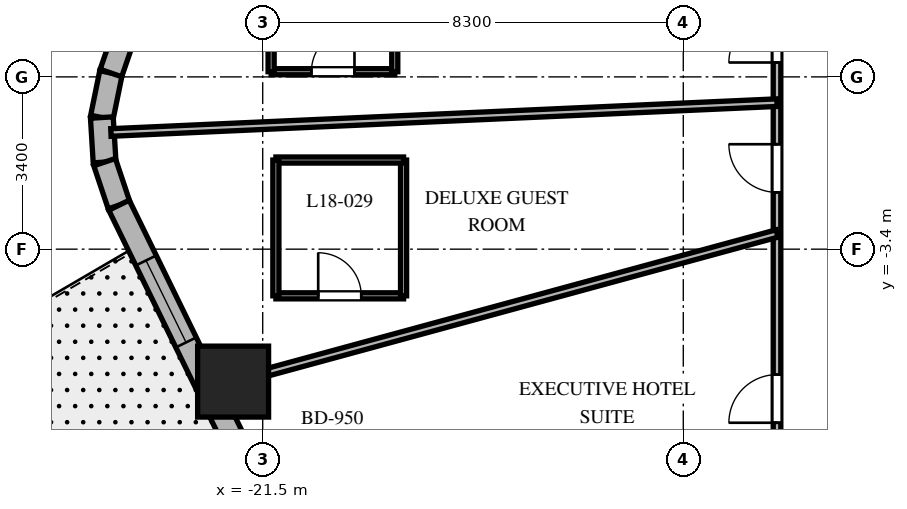
"""IFC4 building model, lengths in metres.
Left out: names, types, materials, properties, quantities, classifications, styles, units other than length and angle.
Written with IfcOpenShell. Run it as: python <this file> out.ifc"""

import sys

from ifc_helpers import new_model, si_unit, direction, frame, frame_2d, origin, origin_2d, place, context, subcontext, project, spatial, rectangle, extrude, element, fill, save


model = new_model("IFC4")
c1 = context("Model", 3, precision=1e-05, world=origin(), true_north=direction((0.0, 1.0)))
c2 = subcontext(c1, "Body", "Model", "MODEL_VIEW")
j1 = project(units=[si_unit("LENGTHUNIT", "METRE"), si_unit("PLANEANGLEUNIT", "RADIAN")], contexts=[c1])
p1 = place(None, origin())
s1 = spatial("IfcSite", under=j1, at=p1, CompositionType="ELEMENT")
p2 = place(p1, origin())
s2 = spatial("IfcBuilding", under=s1, at=p2, CompositionType="ELEMENT")
p3 = place(p2, frame((0.0, 0.0, 78.6)))
s3 = spatial("IfcBuildingStorey", under=s2, at=p3, CompositionType="ELEMENT", Elevation=78.6)
p4 = place(p3, frame((-22.084, -6.014, 0.0), z_axis=(0.0, 0.0, 1.0), x_axis=(1.0, 0.0, 0.0)))
e1 = element("IfcColumn", 1, at=p4, inside=s3, PredefinedType="COLUMN", context=c2, shape_type="SweptSolid", body=[
    extrude(rectangle(XDim=1.4, YDim=1.4, at=origin_2d()), origin(), (0.0, 0.0, 1.0), 3.7),
])
p5 = place(p3, frame((-24.496, 0.077, 0.0), z_axis=(0.0, 0.0, 1.0), x_axis=(-0.199570594521, -0.979883451132, 0.0)))
e2 = element("IfcWall", 2, at=p5, inside=s3, PredefinedType="SOLIDWALL", context=c2, shape_type="SweptSolid", body=[
    extrude(rectangle(XDim=0.897, YDim=0.45, at=frame_2d((0.448, 0.0))), origin(), (0.0, 0.0, 1.0), 3.4),
])
p6 = place(p3, frame((-24.675, -0.802, 0.0), z_axis=(0.0, 0.0, 1.0), x_axis=(0.061188874166, -0.998126205286, 0.0)))
e3 = element("IfcWall", 3, at=p6, inside=s3, PredefinedType="SOLIDWALL", context=c2, shape_type="SweptSolid", body=[
    extrude(rectangle(XDim=0.882, YDim=0.45, at=frame_2d((0.441, 0.0))), origin(), (0.0, 0.0, 1.0), 3.4),
])
p7 = place(p3, frame((-24.621, -1.682, 0.0), z_axis=(0.0, 0.0, 1.0), x_axis=(0.317697451681, -0.948192137278, 0.0)))
e4 = element("IfcWall", 4, at=p7, inside=s3, PredefinedType="SOLIDWALL", context=c2, shape_type="SweptSolid", body=[
    extrude(rectangle(XDim=0.897, YDim=0.45, at=frame_2d((0.448, 0.0))), origin(), (0.0, 0.0, 1.0), 3.4),
])
p8 = place(p3, frame((-17.39, 20.678, 0.0), z_axis=(0.0, 0.0, 1.0), x_axis=(-0.326068018294, -0.945346310854, 0.0)))
e5 = element("IfcWall", 5, at=p8, inside=s3, PredefinedType="SOLIDWALL", context=c2, shape_type="SweptSolid", body=[
    extrude(rectangle(XDim=21.793, YDim=0.45, at=frame_2d((10.896, 0.0))), origin(), (0.0, 0.0, 1.0), 3.4),
])
p9 = place(p8, frame((5.493, 0.0, 0.0)))
e6 = element("IfcOpeningElement", 6, at=p9, cuts=e5, PredefinedType="OPENING", context=c2, shape_type="SweptSolid", body=[
    extrude(rectangle(XDim=1.0, YDim=2.15, at=frame_2d((0.5, 1.075))), frame((0.0, 0.235, 0.0), z_axis=(0.0, -1.0, 0.0), x_axis=(1.0, 0.0, 0.0)), (0.0, 0.0, 1.0), 0.47),
])
p10 = place(p8, frame((1.26, 0.0, 0.8)))
e7 = element("IfcOpeningElement", 7, at=p10, cuts=e5, PredefinedType="OPENING", context=c2, shape_type="SweptSolid", body=[
    extrude(rectangle(XDim=1.8, YDim=1.8, at=frame_2d((0.9, 0.9))), frame((0.0, 0.235, 0.0), z_axis=(0.0, -1.0, 0.0), x_axis=(1.0, 0.0, 0.0)), (0.0, 0.0, 1.0), 0.47),
])
p11 = place(p8, frame((7.283, 0.0, 0.8)))
e8 = element("IfcOpeningElement", 8, at=p11, cuts=e5, PredefinedType="OPENING", context=c2, shape_type="SweptSolid", body=[
    extrude(rectangle(XDim=1.8, YDim=1.8, at=frame_2d((0.9, 0.9))), frame((0.0, 0.235, 0.0), z_axis=(0.0, -1.0, 0.0), x_axis=(1.0, 0.0, 0.0)), (0.0, 0.0, 1.0), 0.47),
])
p12 = place(p8, frame((12.736, 0.0, 0.8)))
e9 = element("IfcOpeningElement", 9, at=p12, cuts=e5, PredefinedType="OPENING", context=c2, shape_type="SweptSolid", body=[
    extrude(rectangle(XDim=1.8, YDim=1.8, at=frame_2d((0.9, 0.9))), frame((0.0, 0.235, 0.0), z_axis=(0.0, -1.0, 0.0), x_axis=(1.0, 0.0, 0.0)), (0.0, 0.0, 1.0), 0.47),
])
p13 = place(p8, frame((18.68, 0.0, 0.8)))
e10 = element("IfcOpeningElement", 10, at=p13, cuts=e5, PredefinedType="OPENING", context=c2, shape_type="SweptSolid", body=[
    extrude(rectangle(XDim=1.8, YDim=1.8, at=frame_2d((0.9, 0.9))), frame((0.0, 0.235, 0.0), z_axis=(0.0, -1.0, 0.0), x_axis=(1.0, 0.0, 0.0)), (0.0, 0.0, 1.0), 0.47),
])
p14 = place(p3, frame((-24.336, -2.532, 0.0), z_axis=(0.0, 0.0, 1.0), x_axis=(0.438931326393, -0.898520612291, 0.0)))
e11 = element("IfcWall", 11, at=p14, inside=s3, PredefinedType="SOLIDWALL", context=c2, shape_type="SweptSolid", body=[
    extrude(rectangle(XDim=20.623, YDim=0.45, at=frame_2d((10.312, 0.0))), origin(), (0.0, 0.0, 1.0), 3.4),
])
p15 = place(p14, frame((5.171, 0.0, 0.0)))
e12 = element("IfcOpeningElement", 12, at=p15, cuts=e11, PredefinedType="OPENING", context=c2, shape_type="SweptSolid", body=[
    extrude(rectangle(XDim=0.95, YDim=2.15, at=frame_2d((0.475, 1.075))), frame((0.0, 0.235, 0.0), z_axis=(0.0, -1.0, 0.0), x_axis=(1.0, 0.0, 0.0)), (0.0, 0.0, 1.0), 0.47),
])
p16 = place(p14, frame((1.214, 0.0, 0.8)))
e13 = element("IfcOpeningElement", 13, at=p16, cuts=e11, PredefinedType="OPENING", context=c2, shape_type="SweptSolid", body=[
    extrude(rectangle(XDim=1.8, YDim=1.8, at=frame_2d((0.9, 0.9))), frame((0.0, 0.235, 0.0), z_axis=(0.0, -1.0, 0.0), x_axis=(1.0, 0.0, 0.0)), (0.0, 0.0, 1.0), 0.47),
])
p17 = place(p14, frame((9.462, 0.0, 0.8)))
e14 = element("IfcOpeningElement", 14, at=p17, cuts=e11, PredefinedType="OPENING", context=c2, shape_type="SweptSolid", body=[
    extrude(rectangle(XDim=1.8, YDim=1.8, at=frame_2d((0.9, 0.9))), frame((0.0, 0.235, 0.0), z_axis=(0.0, -1.0, 0.0), x_axis=(1.0, 0.0, 0.0)), (0.0, 0.0, 1.0), 0.47),
])
p18 = place(p14, frame((17.66, 0.0, 0.8)))
e15 = element("IfcOpeningElement", 15, at=p18, cuts=e11, PredefinedType="OPENING", context=c2, shape_type="SweptSolid", body=[
    extrude(rectangle(XDim=1.8, YDim=1.8, at=frame_2d((0.9, 0.9))), frame((0.0, 0.235, 0.0), z_axis=(0.0, -1.0, 0.0), x_axis=(1.0, 0.0, 0.0)), (0.0, 0.0, 1.0), 0.47),
])
p19 = place(p3, frame((-11.35, -9.85, 0.0), z_axis=(0.0, 0.0, 1.0), x_axis=(0.0, 1.0, 0.0)))
e16 = element("IfcWall", 16, at=p19, inside=s3, PredefinedType="PARTITIONING", context=c2, shape_type="SweptSolid", body=[
    extrude(rectangle(XDim=19.7, YDim=0.15, at=frame_2d((9.85, 0.0))), origin(), (0.0, 0.0, 1.0), 2.84),
])
p20 = place(p19, frame((17.206, 0.0, 0.0)))
e17 = element("IfcOpeningElement", 17, at=p20, cuts=e16, PredefinedType="OPENING", context=c2, shape_type="SweptSolid", body=[
    extrude(rectangle(XDim=0.9, YDim=2.03, at=frame_2d((0.45, 1.015))), frame((0.0, 0.085, 0.0), z_axis=(0.0, -1.0, 0.0), x_axis=(1.0, 0.0, 0.0)), (0.0, 0.0, 1.0), 0.17),
])
p21 = place(p19, frame((13.403, 0.0, 0.0)))
e18 = element("IfcOpeningElement", 18, at=p21, cuts=e16, PredefinedType="OPENING", context=c2, shape_type="SweptSolid", body=[
    extrude(rectangle(XDim=0.95, YDim=2.03, at=frame_2d((0.475, 1.015))), frame((0.0, 0.085, 0.0), z_axis=(0.0, -1.0, 0.0), x_axis=(1.0, 0.0, 0.0)), (0.0, 0.0, 1.0), 0.17),
])
p22 = place(p19, frame((10.134, 0.0, 0.0)))
e19 = element("IfcOpeningElement", 19, at=p22, cuts=e16, PredefinedType="OPENING", context=c2, shape_type="SweptSolid", body=[
    extrude(rectangle(XDim=0.95, YDim=2.03, at=frame_2d((0.475, 1.015))), frame((0.0, 0.085, 0.0), z_axis=(0.0, -1.0, 0.0), x_axis=(1.0, 0.0, 0.0)), (0.0, 0.0, 1.0), 0.17),
])
p23 = place(p19, frame((7.571, 0.0, 0.0)))
e20 = element("IfcOpeningElement", 20, at=p23, cuts=e16, PredefinedType="OPENING", context=c2, shape_type="SweptSolid", body=[
    extrude(rectangle(XDim=0.95, YDim=2.03, at=frame_2d((0.475, 1.015))), frame((0.0, 0.085, 0.0), z_axis=(0.0, -1.0, 0.0), x_axis=(1.0, 0.0, 0.0)), (0.0, 0.0, 1.0), 0.17),
])
p24 = place(p19, frame((3.024, 0.0, 0.0)))
e21 = element("IfcOpeningElement", 21, at=p24, cuts=e16, PredefinedType="OPENING", context=c2, shape_type="SweptSolid", body=[
    extrude(rectangle(XDim=0.95, YDim=2.03, at=frame_2d((0.475, 1.015))), frame((0.0, 0.085, 0.0), z_axis=(0.0, -1.0, 0.0), x_axis=(1.0, 0.0, 0.0)), (0.0, 0.0, 1.0), 0.17),
])
p25 = place(p3, frame((-11.35, -0.508, 0.0), z_axis=(0.0, 0.0, 1.0), x_axis=(-0.998998237556, -0.044749540337, 0.0)))
e22 = element("IfcWall", 22, at=p25, inside=s3, PredefinedType="PARTITIONING", context=c2, shape_type="SweptSolid", body=[
    extrude(rectangle(XDim=13.159, YDim=0.15, at=frame_2d((6.58, 0.0))), origin(), (0.0, 0.0, 1.0), 2.54),
])
p26 = place(p3, frame((-11.35, -3.091, 0.0), z_axis=(0.0, 0.0, 1.0), x_axis=(-0.964859685283, -0.262765651704, 0.0)))
e23 = element("IfcWall", 23, at=p26, inside=s3, PredefinedType="PARTITIONING", context=c2, shape_type="SweptSolid", body=[
    extrude(rectangle(XDim=11.629, YDim=0.15, at=frame_2d((5.814, 0.0))), origin(), (0.0, 0.0, 1.0), 2.54),
])
p27 = place(p3, frame((-21.334, 0.102, 0.0), z_axis=(0.0, 0.0, 1.0), x_axis=(1.0, 0.0, 0.0)))
e24 = element("IfcWall", 24, at=p27, inside=s3, PredefinedType="PARTITIONING", context=c2, shape_type="SweptSolid", body=[
    extrude(rectangle(XDim=2.44, YDim=0.12, at=frame_2d((1.22, 0.0))), origin(), (0.0, 0.0, 1.0), 3.4),
])
p28 = place(p27, frame((0.795, 0.0, 0.0)))
e25 = element("IfcOpeningElement", 25, at=p28, cuts=e24, PredefinedType="OPENING", context=c2, shape_type="SweptSolid", body=[
    extrude(rectangle(XDim=0.85, YDim=2.03, at=frame_2d((0.425, 1.015))), frame((0.0, 0.07, 0.0), z_axis=(0.0, -1.0, 0.0), x_axis=(1.0, 0.0, 0.0)), (0.0, 0.0, 1.0), 0.14),
])
for number, where, z_axis, x_axis in (
    (26, (-18.894, 0.102, 0.0), (0.0, 0.0, 1.0), (0.0, 1.0, 0.0)),
    (27, (-21.334, 2.712, 0.0), (0.0, 0.0, 1.0), (0.0, -1.0, 0.0)),
):
    element("IfcWall", number, at=place(p3, frame(where, z_axis=z_axis, x_axis=x_axis)), inside=s3, PredefinedType="PARTITIONING", context=c2, shape_type="SweptSolid", body=[
        extrude(rectangle(XDim=2.61, YDim=0.12, at=frame_2d((1.305, 0.0))), origin(), (0.0, 0.0, 1.0), 3.4),
    ])
p29 = place(p3, frame((-21.24, -4.321, 0.0), z_axis=(0.0, 0.0, 1.0), x_axis=(1.0, 0.0, 0.0)))
e28 = element("IfcWall", 28, at=p29, inside=s3, PredefinedType="PARTITIONING", context=c2, shape_type="SweptSolid", body=[
    extrude(rectangle(XDim=2.52, YDim=0.12, at=frame_2d((1.26, 0.0))), origin(), (0.0, 0.0, 1.0), 3.4),
])
p30 = place(p29, frame((0.835, 0.0, 0.0)))
e29 = element("IfcOpeningElement", 29, at=p30, cuts=e28, PredefinedType="OPENING", context=c2, shape_type="SweptSolid", body=[
    extrude(rectangle(XDim=0.85, YDim=2.03, at=frame_2d((0.425, 1.015))), frame((0.0, 0.07, 0.0), z_axis=(0.0, -1.0, 0.0), x_axis=(1.0, 0.0, 0.0)), (0.0, 0.0, 1.0), 0.14),
])
p31 = place(p3, frame((-18.72, -4.321, 0.0), z_axis=(0.0, 0.0, 1.0), x_axis=(0.0, 1.0, 0.0)))
e30 = element("IfcWall", 30, at=p31, inside=s3, PredefinedType="PARTITIONING", context=c2, shape_type="SweptSolid", body=[
    extrude(rectangle(XDim=2.68, YDim=0.12, at=frame_2d((1.34, 0.0))), origin(), (0.0, 0.0, 1.0), 3.4),
])
p32 = place(p3, frame((-18.72, -1.641, 0.0), z_axis=(0.0, 0.0, 1.0), x_axis=(-1.0, 0.0, 0.0)))
e31 = element("IfcWall", 31, at=p32, inside=s3, PredefinedType="PARTITIONING", context=c2, shape_type="SweptSolid", body=[
    extrude(rectangle(XDim=2.52, YDim=0.12, at=frame_2d((1.26, 0.0))), origin(), (0.0, 0.0, 1.0), 3.4),
])
p33 = place(p3, frame((-21.24, -1.641, 0.0), z_axis=(0.0, 0.0, 1.0), x_axis=(0.0, -1.0, 0.0)))
e32 = element("IfcWall", 32, at=p33, inside=s3, PredefinedType="PARTITIONING", context=c2, shape_type="SweptSolid", body=[
    extrude(rectangle(XDim=2.68, YDim=0.12, at=frame_2d((1.34, 0.0))), origin(), (0.0, 0.0, 1.0), 3.4),
])
p34 = place(p16, origin())
e33 = element("IfcWindow", 33, at=p34, inside=s3, PartitioningType="SINGLE_PANEL", PredefinedType="WINDOW", context=c2, shape_type="SweptSolid", body=[
    extrude(rectangle(XDim=1.8, YDim=1.8, at=frame_2d((0.9, 0.9))), frame((0.0, 0.03, 0.0), z_axis=(0.0, -1.0, 0.0), x_axis=(1.0, 0.0, 0.0)), (0.0, 0.0, 1.0), 0.06),
])
fill(e13, e33)
p35 = place(p22, origin())
e34 = element("IfcDoor", 34, at=p35, inside=s3, OperationType="SINGLE_SWING_LEFT", PredefinedType="DOOR", context=c2, shape_type="SweptSolid", body=[
    extrude(rectangle(XDim=0.95, YDim=2.03, at=frame_2d((0.475, 1.015))), frame((0.0, 0.025, 0.0), z_axis=(0.0, -1.0, 0.0), x_axis=(1.0, 0.0, 0.0)), (0.0, 0.0, 1.0), 0.05),
])
fill(e19, e34)
p36 = place(p28, origin())
e35 = element("IfcDoor", 35, at=p36, inside=s3, OperationType="SINGLE_SWING_RIGHT", PredefinedType="DOOR", context=c2, shape_type="SweptSolid", body=[
    extrude(rectangle(XDim=0.85, YDim=2.03, at=frame_2d((0.425, 1.015))), frame((0.0, 0.025, 0.0), z_axis=(0.0, -1.0, 0.0), x_axis=(1.0, 0.0, 0.0)), (0.0, 0.0, 1.0), 0.05),
])
fill(e25, e35)
p37 = place(p23, origin())
e36 = element("IfcDoor", 36, at=p37, inside=s3, OperationType="SINGLE_SWING_RIGHT", PredefinedType="DOOR", context=c2, shape_type="SweptSolid", body=[
    extrude(rectangle(XDim=0.95, YDim=2.03, at=frame_2d((0.475, 1.015))), frame((0.0, 0.025, 0.0), z_axis=(0.0, -1.0, 0.0), x_axis=(1.0, 0.0, 0.0)), (0.0, 0.0, 1.0), 0.05),
])
fill(e20, e36)
p38 = place(p30, origin())
e37 = element("IfcDoor", 37, at=p38, inside=s3, OperationType="SINGLE_SWING_LEFT", PredefinedType="DOOR", context=c2, shape_type="SweptSolid", body=[
    extrude(rectangle(XDim=0.85, YDim=2.03, at=frame_2d((0.425, 1.015))), frame((0.0, 0.025, 0.0), z_axis=(0.0, -1.0, 0.0), x_axis=(1.0, 0.0, 0.0)), (0.0, 0.0, 1.0), 0.05),
])
fill(e29, e37)
p39 = place(p24, origin())
e38 = element("IfcDoor", 38, at=p39, inside=s3, OperationType="SINGLE_SWING_LEFT", PredefinedType="DOOR", context=c2, shape_type="SweptSolid", body=[
    extrude(rectangle(XDim=0.95, YDim=2.03, at=frame_2d((0.475, 1.015))), frame((0.0, 0.025, 0.0), z_axis=(0.0, -1.0, 0.0), x_axis=(1.0, 0.0, 0.0)), (0.0, 0.0, 1.0), 0.05),
])
fill(e21, e38)
save(model, sys.argv[1])
